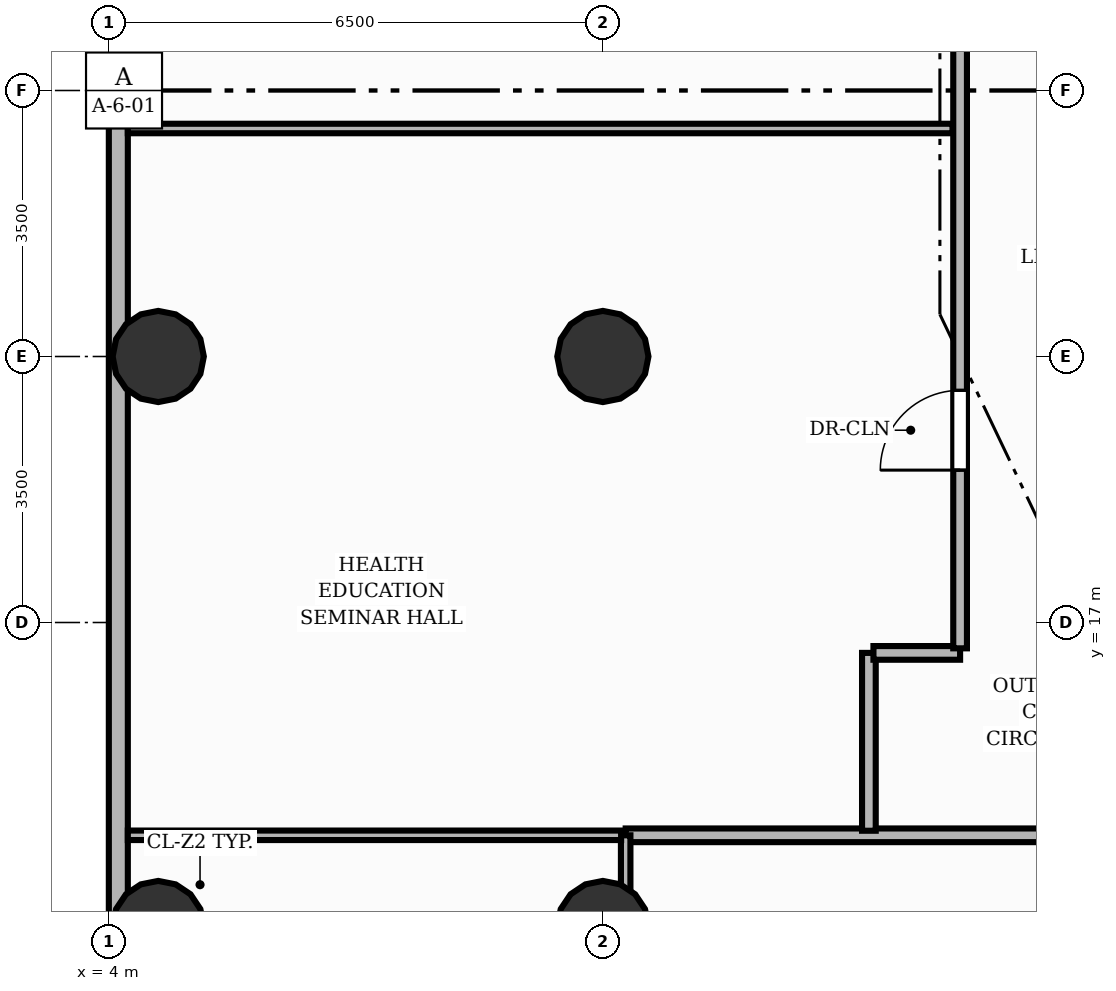
"""IFC4 building model, lengths in metres.
Left out: names, types, materials, properties, quantities, classifications, styles, units other than length and angle.
Written with IfcOpenShell. Run it as: python <this file> out.ifc"""

import sys

from ifc_helpers import new_model, si_unit, direction, frame, frame_2d, origin, origin_2d, place, context, subcontext, project, spatial, rectangle, circle, extrude, element, fill, save


model = new_model("IFC4")
c1 = context("Model", 3, precision=1e-05, world=origin(), true_north=direction((0.0, 1.0)))
c2 = subcontext(c1, "Body", "Model", "MODEL_VIEW")
j1 = project(units=[si_unit("LENGTHUNIT", "METRE"), si_unit("PLANEANGLEUNIT", "RADIAN")], contexts=[c1])
p1 = place(None, origin())
s1 = spatial("IfcSite", under=j1, at=p1, CompositionType="ELEMENT")
p2 = place(p1, origin())
s2 = spatial("IfcBuilding", under=s1, at=p2, CompositionType="ELEMENT")
p3 = place(p2, frame((0.0, 0.0, 20.0)))
s3 = spatial("IfcBuildingStorey", under=s2, at=p3, CompositionType="ELEMENT", Elevation=20.0)
for number, where, z_axis, x_axis in (
    (1, (4.65, 13.0, 0.0), (0.0, 0.0, 1.0), (1.0, 0.0, 0.0)),
    (2, (4.65, 20.5, 0.0), (0.0, 0.0, 1.0), (1.0, 0.0, 0.0)),
    (3, (10.5, 13.0, 0.0), (0.0, 0.0, 1.0), (1.0, 0.0, 0.0)),
    (4, (10.5, 20.5, 0.0), (0.0, 0.0, 1.0), (1.0, 0.0, 0.0)),
):
    element("IfcColumn", number, at=place(p3, frame(where, z_axis=z_axis, x_axis=x_axis)), inside=s3, PredefinedType="COLUMN", context=c2, shape_type="SweptSolid", body=[
        extrude(circle(Radius=0.6, at=origin_2d()), origin(), (0.0, 0.0, 1.0), 4.8),
    ])
p4 = place(p3, frame((4.125, 8.9, 0.0), z_axis=(0.0, 0.0, 1.0), x_axis=(0.0, 1.0, 0.0)))
e5 = element("IfcWall", 5, at=p4, inside=s3, PredefinedType="SOLIDWALL", context=c2, shape_type="SweptSolid", body=[
    extrude(rectangle(XDim=30.2, YDim=0.25, at=frame_2d((15.1, 0.0))), origin(), (0.0, 0.0, 1.0), 4.56),
])
p5 = place(p4, frame((23.26, 0.0, 0.9)))
e6 = element("IfcOpeningElement", 6, at=p5, cuts=e5, PredefinedType="OPENING", context=c2, shape_type="SweptSolid", body=[
    extrude(rectangle(XDim=1.8, YDim=1.8, at=frame_2d((0.9, 0.9))), frame((0.0, 0.135, 0.0), z_axis=(0.0, -1.0, 0.0), x_axis=(1.0, 0.0, 0.0)), (0.0, 0.0, 1.0), 0.27),
])
p6 = place(p3, frame((41.02, 14.2, 0.0), z_axis=(0.0, 0.0, 1.0), x_axis=(-1.0, 0.0, 0.0)))
e7 = element("IfcWall", 7, at=p6, inside=s3, PredefinedType="PARTITIONING", context=c2, shape_type="SweptSolid", body=[
    extrude(rectangle(XDim=30.22, YDim=0.18, at=frame_2d((15.11, 0.0))), origin(), (0.0, 0.0, 1.0), 2.588),
])
p7 = place(p6, frame((20.085, 0.0, 0.0)))
e8 = element("IfcOpeningElement", 8, at=p7, cuts=e7, PredefinedType="OPENING", context=c2, shape_type="SweptSolid", body=[
    extrude(rectangle(XDim=1.05, YDim=2.15, at=frame_2d((0.525, 1.075))), frame((0.0, 0.1, 0.0), z_axis=(0.0, -1.0, 0.0), x_axis=(1.0, 0.0, 0.0)), (0.0, 0.0, 1.0), 0.2),
])
p8 = place(p6, frame((14.745, 0.0, 0.0)))
e9 = element("IfcOpeningElement", 9, at=p8, cuts=e7, PredefinedType="OPENING", context=c2, shape_type="SweptSolid", body=[
    extrude(rectangle(XDim=1.05, YDim=2.15, at=frame_2d((0.525, 1.075))), frame((0.0, 0.1, 0.0), z_axis=(0.0, -1.0, 0.0), x_axis=(1.0, 0.0, 0.0)), (0.0, 0.0, 1.0), 0.2),
])
p9 = place(p6, frame((5.745, 0.0, 0.0)))
e10 = element("IfcOpeningElement", 10, at=p9, cuts=e7, PredefinedType="OPENING", context=c2, shape_type="SweptSolid", body=[
    extrude(rectangle(XDim=1.05, YDim=2.15, at=frame_2d((0.525, 1.075))), frame((0.0, 0.1, 0.0), z_axis=(0.0, -1.0, 0.0), x_axis=(1.0, 0.0, 0.0)), (0.0, 0.0, 1.0), 0.2),
])
p10 = place(p3, frame((14.0, 14.26, 0.0), z_axis=(0.0, 0.0, 1.0), x_axis=(0.0, 1.0, 0.0)))
e11 = element("IfcWall", 11, at=p10, inside=s3, PredefinedType="PARTITIONING", context=c2, shape_type="SweptSolid", body=[
    extrude(rectangle(XDim=2.34, YDim=0.18, at=frame_2d((1.17, 0.0))), origin(), (0.0, 0.0, 1.0), 4.345),
])
p11 = place(p3, frame((14.06, 16.6, 0.0), z_axis=(0.0, 0.0, 1.0), x_axis=(1.0, 0.0, 0.0)))
e12 = element("IfcWall", 12, at=p11, inside=s3, PredefinedType="PARTITIONING", context=c2, shape_type="SweptSolid", body=[
    extrude(rectangle(XDim=1.14, YDim=0.18, at=frame_2d((0.57, 0.0))), origin(), (0.0, 0.0, 1.0), 4.345),
])
p12 = place(p3, frame((15.2, 16.66, 0.0), z_axis=(0.0, 0.0, 1.0), x_axis=(0.0, 1.0, 0.0)))
e13 = element("IfcWall", 13, at=p12, inside=s3, PredefinedType="PARTITIONING", context=c2, shape_type="SweptSolid", body=[
    extrude(rectangle(XDim=11.36, YDim=0.18, at=frame_2d((5.68, 0.0))), origin(), (0.0, 0.0, 1.0), 3.928),
])
p13 = place(p12, frame((2.345, 0.0, 0.0)))
e14 = element("IfcOpeningElement", 14, at=p13, cuts=e13, PredefinedType="OPENING", context=c2, shape_type="SweptSolid", body=[
    extrude(rectangle(XDim=1.05, YDim=2.15, at=frame_2d((0.525, 1.075))), frame((0.0, 0.1, 0.0), z_axis=(0.0, -1.0, 0.0), x_axis=(1.0, 0.0, 0.0)), (0.0, 0.0, 1.0), 0.2),
])
p14 = place(p12, frame((8.565, 0.0, 0.0)))
e15 = element("IfcOpeningElement", 15, at=p14, cuts=e13, PredefinedType="OPENING", context=c2, shape_type="SweptSolid", body=[
    extrude(rectangle(XDim=1.05, YDim=2.15, at=frame_2d((0.525, 1.075))), frame((0.0, 0.1, 0.0), z_axis=(0.0, -1.0, 0.0), x_axis=(1.0, 0.0, 0.0)), (0.0, 0.0, 1.0), 0.2),
])
p15 = place(p3, frame((10.8, 14.2, 0.0), z_axis=(0.0, 0.0, 1.0), x_axis=(0.0, -1.0, 0.0)))
e16 = element("IfcWall", 16, at=p15, inside=s3, PredefinedType="PARTITIONING", context=c2, shape_type="SweptSolid", body=[
    extrude(rectangle(XDim=9.95, YDim=0.125, at=frame_2d((4.975, 0.0))), origin(), (0.0, 0.0, 1.0), 2.588),
])
p16 = place(p15, frame((4.45, 0.0, 0.0)))
e17 = element("IfcOpeningElement", 17, at=p16, cuts=e16, PredefinedType="OPENING", context=c2, shape_type="SweptSolid", body=[
    extrude(rectangle(XDim=1.05, YDim=2.15, at=frame_2d((0.525, 1.075))), frame((0.0, 0.073, 0.0), z_axis=(0.0, -1.0, 0.0), x_axis=(1.0, 0.0, 0.0)), (0.0, 0.0, 1.0), 0.145),
])
p17 = place(p3, frame((4.25, 14.2, 0.0), z_axis=(0.0, 0.0, 1.0), x_axis=(1.0, 0.0, 0.0)))
e18 = element("IfcWall", 18, at=p17, inside=s3, PredefinedType="PARTITIONING", context=c2, shape_type="SweptSolid", body=[
    extrude(rectangle(XDim=6.49, YDim=0.125, at=frame_2d((3.245, 0.0))), origin(), (0.0, 0.0, 1.0), 4.345),
])
p18 = place(p3, frame((4.25, 23.5, 0.0), z_axis=(0.0, 0.0, 1.0), x_axis=(1.0, 0.0, 0.0)))
e19 = element("IfcWall", 19, at=p18, inside=s3, PredefinedType="PARTITIONING", context=c2, shape_type="SweptSolid", body=[
    extrude(rectangle(XDim=10.85, YDim=0.125, at=frame_2d((5.425, 0.0))), origin(), (0.0, 0.0, 1.0), 4.345),
])
p19 = place(p13, origin())
e20 = element("IfcDoor", 20, at=p19, inside=s3, OperationType="SINGLE_SWING_LEFT", PredefinedType="DOOR", context=c2, shape_type="SweptSolid", body=[
    extrude(rectangle(XDim=1.05, YDim=2.15, at=frame_2d((0.525, 1.075))), frame((0.0, 0.025, 0.0), z_axis=(0.0, -1.0, 0.0), x_axis=(1.0, 0.0, 0.0)), (0.0, 0.0, 1.0), 0.05),
])
fill(e14, e20)
save(model, sys.argv[1])
